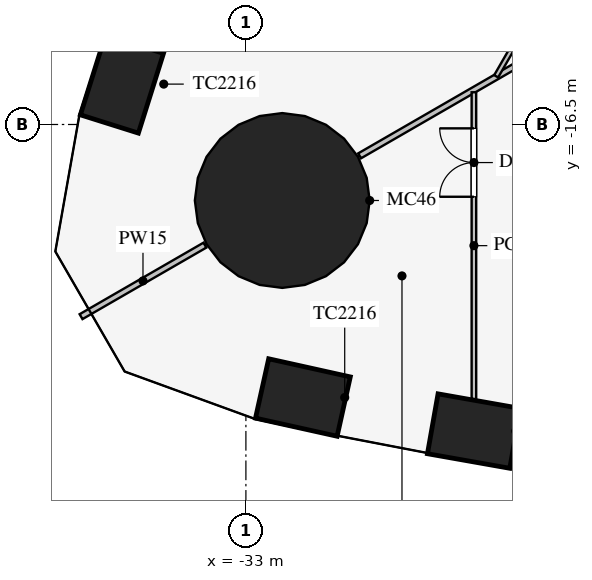
"""IFC4 building model, lengths in metres.
Left out: names, types, materials, properties, quantities, classifications, styles, units other than length and angle.
Written with IfcOpenShell. Run it as: python <this file> out.ifc"""

import sys

from ifc_helpers import new_model, si_unit, direction, frame, frame_2d, origin, origin_2d, place, context, subcontext, project, spatial, rectangle, circle, extrude, element, fill, save


model = new_model("IFC4")
c1 = context("Model", 3, precision=1e-05, world=origin(), true_north=direction((0.0, 1.0)))
c2 = subcontext(c1, "Body", "Model", "MODEL_VIEW")
j1 = project(units=[si_unit("LENGTHUNIT", "METRE"), si_unit("PLANEANGLEUNIT", "RADIAN")], contexts=[c1])
p1 = place(None, origin())
s1 = spatial("IfcSite", under=j1, at=p1, CompositionType="ELEMENT")
p2 = place(p1, origin())
s2 = spatial("IfcBuilding", under=s1, at=p2, CompositionType="ELEMENT")
p3 = place(p2, frame((0.0, 0.0, 75.3)))
s3 = spatial("IfcBuildingStorey", under=s2, at=p3, CompositionType="ELEMENT", Elevation=75.3)
for number, where, z_axis, x_axis in (
    (1, (-31.5, -23.685, 0.0), (0.0, 0.0, 1.0), (0.976, -0.217, 0.0)),
    (2, (-27.0, -24.568, 0.0), (0.0, 0.0, 1.0), (0.985, -0.174, 0.0)),
    (3, (-36.262, -15.438, 0.0), (0.0, 0.0, 1.0), (-0.3, -0.954, 0.0)),
):
    element("IfcColumn", number, at=place(p3, frame(where, z_axis=z_axis, x_axis=x_axis)), inside=s3, PredefinedType="COLUMN", context=c2, shape_type="SweptSolid", body=[
        extrude(rectangle(XDim=2.2, YDim=1.6, at=origin_2d()), origin(), (0.0, 0.0, 1.0), 4.2),
    ])
p4 = place(p3, frame((-32.043, -18.5, 0.0), z_axis=(0.0, 0.0, 1.0), x_axis=(1.0, 0.0, 0.0)))
e4 = element("IfcColumn", 4, at=p4, inside=s3, PredefinedType="COLUMN", context=c2, shape_type="SweptSolid", body=[
    extrude(circle(Radius=2.3, at=origin_2d()), origin(), (0.0, 0.0, 1.0), 4.2),
])
p5 = place(p3, frame((-14.203, -8.2, 0.0), z_axis=(0.0, 0.0, 1.0), x_axis=(-0.866024965723, -0.500000758745, 0.0)))
e5 = element("IfcWall", 5, at=p5, inside=s3, PredefinedType="PARTITIONING", context=c2, shape_type="SweptSolid", body=[
    extrude(rectangle(XDim=18.25, YDim=0.15, at=frame_2d((9.125, 0.0))), origin(), (0.0, 0.0, 1.0), 2.3),
])
p6 = place(p3, frame((-34.078, -19.675, 0.0), z_axis=(0.0, 0.0, 1.0), x_axis=(-0.866019247219, -0.500010663332, 0.0)))
e6 = element("IfcWall", 6, at=p6, inside=s3, PredefinedType="PARTITIONING", context=c2, shape_type="SweptSolid", body=[
    extrude(rectangle(XDim=3.764, YDim=0.15, at=frame_2d((1.882, 0.0))), origin(), (0.0, 0.0, 1.0), 2.3),
])
p7 = place(p3, frame((-27.0, -15.652, 0.0), z_axis=(0.0, 0.0, 1.0), x_axis=(0.0, -1.0, 0.0)))
e7 = element("IfcWall", 7, at=p7, inside=s3, PredefinedType="PARTITIONING", context=c2, shape_type="SweptSolid", body=[
    extrude(rectangle(XDim=8.073, YDim=0.12, at=frame_2d((4.037, 0.0))), origin(), (0.0, 0.0, 1.0), 2.9),
])
p8 = place(p7, frame((0.95, 0.0, 0.15)))
e8 = element("IfcOpeningElement", 8, at=p8, cuts=e7, PredefinedType="OPENING", context=c2, shape_type="SweptSolid", body=[
    extrude(rectangle(XDim=1.8, YDim=2.1, at=frame_2d((0.9, 1.05))), frame((0.0, 0.07, 0.0), z_axis=(0.0, -1.0, 0.0), x_axis=(1.0, 0.0, 0.0)), (0.0, 0.0, 1.0), 0.14),
])
p9 = place(p3, frame((-0.016, 30.491, 0.0), z_axis=(0.0, 0.0, 1.0), x_axis=(-0.50000091641, -0.866024874695, 0.0)))
e9 = element("IfcWall", 9, at=p9, inside=s3, PredefinedType="PARTITIONING", context=c2, shape_type="SweptSolid", body=[
    extrude(rectangle(XDim=52.796, YDim=0.12, at=frame_2d((26.398, 0.0))), origin(), (0.0, 0.0, 1.0), 2.9),
])
p10 = place(p9, frame((10.2, 0.0, 0.15)))
e10 = element("IfcOpeningElement", 10, at=p10, cuts=e9, PredefinedType="OPENING", context=c2, shape_type="SweptSolid", body=[
    extrude(rectangle(XDim=1.8, YDim=2.1, at=frame_2d((0.9, 1.05))), frame((0.0, 0.07, 0.0), z_axis=(0.0, -1.0, 0.0), x_axis=(1.0, 0.0, 0.0)), (0.0, 0.0, 1.0), 0.14),
])
p11 = place(p9, frame((40.8, 0.0, 0.15)))
e11 = element("IfcOpeningElement", 11, at=p11, cuts=e9, PredefinedType="OPENING", context=c2, shape_type="SweptSolid", body=[
    extrude(rectangle(XDim=1.8, YDim=2.1, at=frame_2d((0.9, 1.05))), frame((0.0, 0.07, 0.0), z_axis=(0.0, -1.0, 0.0), x_axis=(1.0, 0.0, 0.0)), (0.0, 0.0, 1.0), 0.14),
])
p12 = place(p8, frame((1.8, 0.0, 0.0), z_axis=(0.0, 0.0, 1.0), x_axis=(-1.0, 0.0, 0.0)))
e12 = element("IfcDoor", 12, at=p12, inside=s3, OperationType="DOUBLE_DOOR_SINGLE_SWING", PredefinedType="DOOR", context=c2, shape_type="SweptSolid", body=[
    extrude(rectangle(XDim=1.8, YDim=2.1, at=frame_2d((0.9, 1.05))), frame((0.0, 0.025, 0.0), z_axis=(0.0, -1.0, 0.0), x_axis=(1.0, 0.0, 0.0)), (0.0, 0.0, 1.0), 0.05),
])
fill(e8, e12)
save(model, sys.argv[1])
